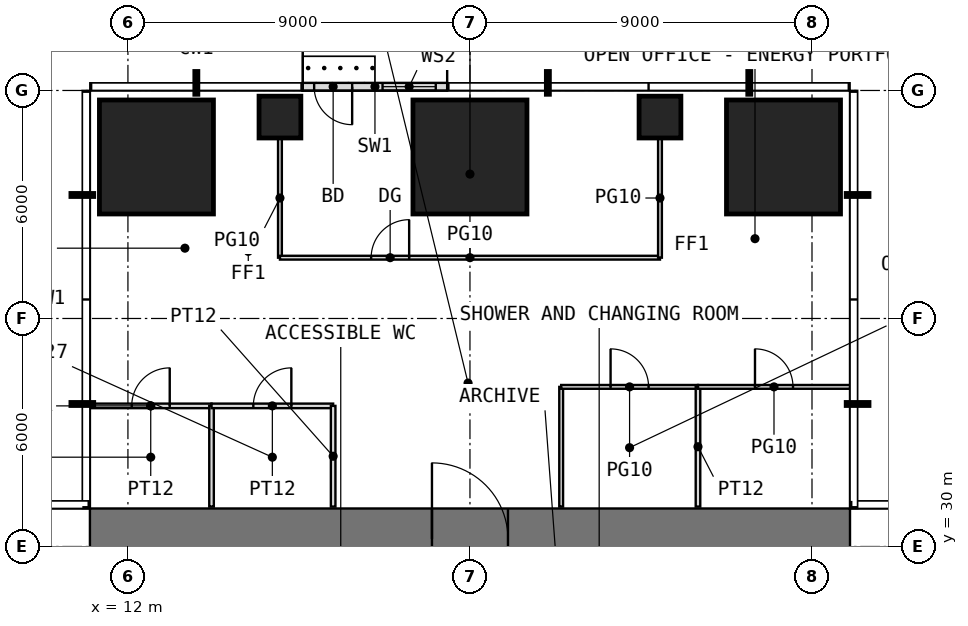
"""IFC4 building model, lengths in metres.
Left out: names, types, materials, properties, quantities, classifications, styles, units other than length and angle.
Written with IfcOpenShell. Run it as: python <this file> out.ifc"""

import sys

from ifc_helpers import new_model, si_unit, direction, frame, frame_2d, origin, origin_2d, place, context, subcontext, project, spatial, rectangle, extrude, element, fill, save


model = new_model("IFC4")
c1 = context("Model", 3, precision=1e-05, world=origin(), true_north=direction((0.0, 1.0)))
c2 = subcontext(c1, "Body", "Model", "MODEL_VIEW")
j1 = project(units=[si_unit("LENGTHUNIT", "METRE"), si_unit("PLANEANGLEUNIT", "RADIAN")], contexts=[c1])
p1 = place(None, origin())
s1 = spatial("IfcSite", under=j1, at=p1, CompositionType="ELEMENT")
p2 = place(p1, origin())
s2 = spatial("IfcBuilding", under=s1, at=p2, CompositionType="ELEMENT")
p3 = place(p2, frame((0.0, 0.0, 132.5)))
s3 = spatial("IfcBuildingStorey", under=s2, at=p3, CompositionType="ELEMENT", Elevation=132.5)
p4 = place(p3, frame((12.75, 40.25, 0.0), z_axis=(0.0, 0.0, 1.0), x_axis=(1.0, 0.0, 0.0)))
e1 = element("IfcColumn", 1, at=p4, inside=s3, PredefinedType="COLUMN", context=c2, shape_type="SweptSolid", body=[
    extrude(rectangle(XDim=3.0, YDim=3.0, at=origin_2d()), origin(), (0.0, 0.0, 1.0), 4.0),
])
p5 = place(p3, frame((16.0, 41.3, 0.0), z_axis=(0.0, 0.0, 1.0), x_axis=(1.0, 0.0, 0.0)))
e2 = element("IfcColumn", 2, at=p5, inside=s3, PredefinedType="COLUMN", context=c2, shape_type="SweptSolid", body=[
    extrude(rectangle(XDim=1.1, YDim=1.1, at=origin_2d()), origin(), (0.0, 0.0, 1.0), 4.0),
])
p6 = place(p3, frame((21.0, 40.25, 0.0), z_axis=(0.0, 0.0, 1.0), x_axis=(1.0, 0.0, 0.0)))
e3 = element("IfcColumn", 3, at=p6, inside=s3, PredefinedType="COLUMN", context=c2, shape_type="SweptSolid", body=[
    extrude(rectangle(XDim=3.0, YDim=3.0, at=origin_2d()), origin(), (0.0, 0.0, 1.0), 4.0),
])
p7 = place(p3, frame((26.0, 41.3, 0.0), z_axis=(0.0, 0.0, 1.0), x_axis=(1.0, 0.0, 0.0)))
e4 = element("IfcColumn", 4, at=p7, inside=s3, PredefinedType="COLUMN", context=c2, shape_type="SweptSolid", body=[
    extrude(rectangle(XDim=1.1, YDim=1.1, at=origin_2d()), origin(), (0.0, 0.0, 1.0), 4.0),
])
p8 = place(p3, frame((29.25, 40.25, 0.0), z_axis=(0.0, 0.0, 1.0), x_axis=(1.0, 0.0, 0.0)))
e5 = element("IfcColumn", 5, at=p8, inside=s3, PredefinedType="COLUMN", context=c2, shape_type="SweptSolid", body=[
    extrude(rectangle(XDim=3.0, YDim=3.0, at=origin_2d()), origin(), (0.0, 0.0, 1.0), 4.0),
])
p9 = place(p3, frame((20.4, 42.1, 0.0), z_axis=(0.0, 0.0, 1.0), x_axis=(-1.0, 0.0, 0.0)))
e6 = element("IfcWall", 6, at=p9, inside=s3, PredefinedType="USERDEFINED", context=c2, shape_type="SweptSolid", body=[
    extrude(rectangle(XDim=3.8, YDim=0.2, at=frame_2d((1.9, 0.0))), origin(), (0.0, 0.0, 1.0), 3.75),
])
p10 = place(p9, frame((2.5, 0.0, 0.0)))
e7 = element("IfcOpeningElement", 7, at=p10, cuts=e6, PredefinedType="OPENING", context=c2, shape_type="SweptSolid", body=[
    extrude(rectangle(XDim=1.0, YDim=2.4, at=frame_2d((0.5, 1.2))), frame((0.0, 0.11, 0.0), z_axis=(0.0, -1.0, 0.0), x_axis=(1.0, 0.0, 0.0)), (0.0, 0.0, 1.0), 0.22),
])
p11 = place(p9, frame((0.3, 0.0, 0.3)))
e8 = element("IfcOpeningElement", 8, at=p11, cuts=e6, PredefinedType="OPENING", context=c2, shape_type="SweptSolid", body=[
    extrude(rectangle(XDim=1.4, YDim=2.7, at=frame_2d((0.7, 1.35))), frame((0.0, 0.11, 0.0), z_axis=(0.0, -1.0, 0.0), x_axis=(1.0, 0.0, 0.0)), (0.0, 0.0, 1.0), 0.22),
])
p12 = place(p3, frame((11.0, 30.2, -0.05), z_axis=(0.0, 0.0, 1.0), x_axis=(1.0, 0.0, 0.0)))
e9 = element("IfcWall", 9, at=p12, inside=s3, PredefinedType="SHEAR", context=c2, shape_type="SweptSolid", body=[
    extrude(rectangle(XDim=20.0, YDim=1.6, at=frame_2d((10.0, 0.0))), origin(), (0.0, 0.0, 1.0), 4.0),
])
p13 = place(p12, frame((9.0, 0.0, 0.05)))
e10 = element("IfcOpeningElement", 10, at=p13, cuts=e9, PredefinedType="OPENING", context=c2, shape_type="SweptSolid", body=[
    extrude(rectangle(XDim=2.0, YDim=2.2, at=frame_2d((1.0, 1.1))), frame((0.0, 0.81, 0.0), z_axis=(0.0, -1.0, 0.0), x_axis=(1.0, 0.0, 0.0)), (0.0, 0.0, 1.0), 1.62),
])
p14 = place(p3, frame((11.0, 33.7, 0.0), z_axis=(0.0, 0.0, 1.0), x_axis=(1.0, 0.0, 0.0)))
e11 = element("IfcWall", 11, at=p14, inside=s3, PredefinedType="PARTITIONING", context=c2, shape_type="SweptSolid", body=[
    extrude(rectangle(XDim=3.2, YDim=0.12, at=frame_2d((1.6, 0.0))), origin(), (0.0, 0.0, 1.0), 3.75),
])
p15 = place(p14, frame((1.1, 0.0, 0.0)))
e12 = element("IfcOpeningElement", 12, at=p15, cuts=e11, PredefinedType="OPENING", context=c2, shape_type="SweptSolid", body=[
    extrude(rectangle(XDim=1.0, YDim=2.2, at=frame_2d((0.5, 1.1))), frame((0.0, 0.07, 0.0), z_axis=(0.0, -1.0, 0.0), x_axis=(1.0, 0.0, 0.0)), (0.0, 0.0, 1.0), 0.14),
])
p16 = place(p3, frame((14.2, 31.05, 0.0), z_axis=(0.0, 0.0, 1.0), x_axis=(0.0, 1.0, 0.0)))
e13 = element("IfcWall", 13, at=p16, inside=s3, PredefinedType="PARTITIONING", context=c2, shape_type="SweptSolid", body=[
    extrude(rectangle(XDim=2.65, YDim=0.12, at=frame_2d((1.325, 0.0))), origin(), (0.0, 0.0, 1.0), 3.75),
])
p17 = place(p3, frame((14.2, 33.7, 0.0), z_axis=(0.0, 0.0, 1.0), x_axis=(1.0, 0.0, 0.0)))
e14 = element("IfcWall", 14, at=p17, inside=s3, PredefinedType="PARTITIONING", context=c2, shape_type="SweptSolid", body=[
    extrude(rectangle(XDim=3.2, YDim=0.12, at=frame_2d((1.6, 0.0))), origin(), (0.0, 0.0, 1.0), 3.75),
])
p18 = place(p17, frame((1.1, 0.0, 0.0)))
e15 = element("IfcOpeningElement", 15, at=p18, cuts=e14, PredefinedType="OPENING", context=c2, shape_type="SweptSolid", body=[
    extrude(rectangle(XDim=1.0, YDim=2.2, at=frame_2d((0.5, 1.1))), frame((0.0, 0.07, 0.0), z_axis=(0.0, -1.0, 0.0), x_axis=(1.0, 0.0, 0.0)), (0.0, 0.0, 1.0), 0.14),
])
p19 = place(p3, frame((16.0, 37.6, 0.0), z_axis=(0.0, 0.0, 1.0), x_axis=(0.0, 1.0, 0.0)))
e16 = element("IfcWall", 16, at=p19, inside=s3, PredefinedType="PARTITIONING", context=c2, shape_type="SweptSolid", body=[
    extrude(rectangle(XDim=3.14, YDim=0.1, at=frame_2d((1.57, 0.0))), origin(), (0.0, 0.0, 1.0), 3.75),
])
p20 = place(p3, frame((16.0, 37.6, 0.0), z_axis=(0.0, 0.0, 1.0), x_axis=(1.0, 0.0, 0.0)))
e17 = element("IfcWall", 17, at=p20, inside=s3, PredefinedType="PARTITIONING", context=c2, shape_type="SweptSolid", body=[
    extrude(rectangle(XDim=10.0, YDim=0.1, at=frame_2d((5.0, 0.0))), origin(), (0.0, 0.0, 1.0), 3.75),
])
p21 = place(p20, frame((2.4, 0.0, 0.0)))
e18 = element("IfcOpeningElement", 18, at=p21, cuts=e17, PredefinedType="OPENING", context=c2, shape_type="SweptSolid", body=[
    extrude(rectangle(XDim=1.0, YDim=2.4, at=frame_2d((0.5, 1.2))), frame((0.0, 0.06, 0.0), z_axis=(0.0, -1.0, 0.0), x_axis=(1.0, 0.0, 0.0)), (0.0, 0.0, 1.0), 0.12),
])
p22 = place(p3, frame((17.4, 31.05, 0.0), z_axis=(0.0, 0.0, 1.0), x_axis=(0.0, 1.0, 0.0)))
e19 = element("IfcWall", 19, at=p22, inside=s3, PredefinedType="PARTITIONING", context=c2, shape_type="SweptSolid", body=[
    extrude(rectangle(XDim=2.65, YDim=0.12, at=frame_2d((1.325, 0.0))), origin(), (0.0, 0.0, 1.0), 3.75),
])
p23 = place(p3, frame((23.4, 31.05, 0.0), z_axis=(0.0, 0.0, 1.0), x_axis=(0.0, 1.0, 0.0)))
e20 = element("IfcWall", 20, at=p23, inside=s3, PredefinedType="PARTITIONING", context=c2, shape_type="SweptSolid", body=[
    extrude(rectangle(XDim=3.15, YDim=0.1, at=frame_2d((1.575, 0.0))), origin(), (0.0, 0.0, 1.0), 3.75),
])
p24 = place(p3, frame((23.4, 34.2, 0.0), z_axis=(0.0, 0.0, 1.0), x_axis=(1.0, 0.0, 0.0)))
e21 = element("IfcWall", 21, at=p24, inside=s3, PredefinedType="PARTITIONING", context=c2, shape_type="SweptSolid", body=[
    extrude(rectangle(XDim=3.6, YDim=0.1, at=frame_2d((1.8, 0.0))), origin(), (0.0, 0.0, 1.0), 3.75),
])
p25 = place(p24, frame((1.3, 0.0, 0.0)))
e22 = element("IfcOpeningElement", 22, at=p25, cuts=e21, PredefinedType="OPENING", context=c2, shape_type="SweptSolid", body=[
    extrude(rectangle(XDim=1.0, YDim=2.4, at=frame_2d((0.5, 1.2))), frame((0.0, 0.06, 0.0), z_axis=(0.0, -1.0, 0.0), x_axis=(1.0, 0.0, 0.0)), (0.0, 0.0, 1.0), 0.12),
])
p26 = place(p3, frame((26.0, 37.6, 0.0), z_axis=(0.0, 0.0, 1.0), x_axis=(0.0, 1.0, 0.0)))
e23 = element("IfcWall", 23, at=p26, inside=s3, PredefinedType="PARTITIONING", context=c2, shape_type="SweptSolid", body=[
    extrude(rectangle(XDim=3.14, YDim=0.1, at=frame_2d((1.57, 0.0))), origin(), (0.0, 0.0, 1.0), 3.75),
])
p27 = place(p3, frame((27.0, 31.05, 0.0), z_axis=(0.0, 0.0, 1.0), x_axis=(0.0, 1.0, 0.0)))
e24 = element("IfcWall", 24, at=p27, inside=s3, PredefinedType="PARTITIONING", context=c2, shape_type="SweptSolid", body=[
    extrude(rectangle(XDim=3.15, YDim=0.12, at=frame_2d((1.575, 0.0))), origin(), (0.0, 0.0, 1.0), 3.75),
])
p28 = place(p3, frame((27.0, 34.2, 0.0), z_axis=(0.0, 0.0, 1.0), x_axis=(1.0, 0.0, 0.0)))
e25 = element("IfcWall", 25, at=p28, inside=s3, PredefinedType="PARTITIONING", context=c2, shape_type="SweptSolid", body=[
    extrude(rectangle(XDim=4.0, YDim=0.1, at=frame_2d((2.0, 0.0))), origin(), (0.0, 0.0, 1.0), 3.75),
])
p29 = place(p28, frame((1.5, 0.0, 0.0)))
e26 = element("IfcOpeningElement", 26, at=p29, cuts=e25, PredefinedType="OPENING", context=c2, shape_type="SweptSolid", body=[
    extrude(rectangle(XDim=1.0, YDim=2.4, at=frame_2d((0.5, 1.2))), frame((0.0, 0.06, 0.0), z_axis=(0.0, -1.0, 0.0), x_axis=(1.0, 0.0, 0.0)), (0.0, 0.0, 1.0), 0.12),
])
p30 = place(p10, origin())
e27 = element("IfcDoor", 27, at=p30, inside=s3, OperationType="SINGLE_SWING_LEFT", PredefinedType="DOOR", context=c2, shape_type="SweptSolid", body=[
    extrude(rectangle(XDim=1.0, YDim=2.4, at=frame_2d((0.5, 1.2))), frame((0.0, 0.025, 0.0), z_axis=(0.0, -1.0, 0.0), x_axis=(1.0, 0.0, 0.0)), (0.0, 0.0, 1.0), 0.05),
])
fill(e7, e27)
p31 = place(p11, origin())
e28 = element("IfcWindow", 28, at=p31, inside=s3, PartitioningType="SINGLE_PANEL", PredefinedType="WINDOW", context=c2, shape_type="SweptSolid", body=[
    extrude(rectangle(XDim=1.4, YDim=2.7, at=frame_2d((0.7, 1.35))), frame((0.0, 0.03, 0.0), z_axis=(0.0, -1.0, 0.0), x_axis=(1.0, 0.0, 0.0)), (0.0, 0.0, 1.0), 0.06),
])
fill(e8, e28)
p32 = place(p13, origin())
e29 = element("IfcDoor", 29, at=p32, inside=s3, OperationType="DOUBLE_DOOR_SINGLE_SWING", PredefinedType="DOOR", context=c2, shape_type="SweptSolid", body=[
    extrude(rectangle(XDim=2.0, YDim=2.2, at=frame_2d((1.0, 1.1))), frame((0.0, 0.025, 0.0), z_axis=(0.0, -1.0, 0.0), x_axis=(1.0, 0.0, 0.0)), (0.0, 0.0, 1.0), 0.05),
])
fill(e10, e29)
p33 = place(p15, origin())
e30 = element("IfcDoor", 30, at=p33, inside=s3, OperationType="SINGLE_SWING_RIGHT", PredefinedType="DOOR", context=c2, shape_type="SweptSolid", body=[
    extrude(rectangle(XDim=1.0, YDim=2.2, at=frame_2d((0.5, 1.1))), frame((0.0, 0.025, 0.0), z_axis=(0.0, -1.0, 0.0), x_axis=(1.0, 0.0, 0.0)), (0.0, 0.0, 1.0), 0.05),
])
fill(e12, e30)
p34 = place(p18, origin())
e31 = element("IfcDoor", 31, at=p34, inside=s3, OperationType="SINGLE_SWING_RIGHT", PredefinedType="DOOR", context=c2, shape_type="SweptSolid", body=[
    extrude(rectangle(XDim=1.0, YDim=2.2, at=frame_2d((0.5, 1.1))), frame((0.0, 0.025, 0.0), z_axis=(0.0, -1.0, 0.0), x_axis=(1.0, 0.0, 0.0)), (0.0, 0.0, 1.0), 0.05),
])
fill(e15, e31)
p35 = place(p25, origin())
e32 = element("IfcDoor", 32, at=p35, inside=s3, OperationType="SINGLE_SWING_LEFT", PredefinedType="DOOR", context=c2, shape_type="SweptSolid", body=[
    extrude(rectangle(XDim=1.0, YDim=2.4, at=frame_2d((0.5, 1.2))), frame((0.0, 0.025, 0.0), z_axis=(0.0, -1.0, 0.0), x_axis=(1.0, 0.0, 0.0)), (0.0, 0.0, 1.0), 0.05),
])
fill(e22, e32)
p36 = place(p29, origin())
e33 = element("IfcDoor", 33, at=p36, inside=s3, OperationType="SINGLE_SWING_LEFT", PredefinedType="DOOR", context=c2, shape_type="SweptSolid", body=[
    extrude(rectangle(XDim=1.0, YDim=2.4, at=frame_2d((0.5, 1.2))), frame((0.0, 0.025, 0.0), z_axis=(0.0, -1.0, 0.0), x_axis=(1.0, 0.0, 0.0)), (0.0, 0.0, 1.0), 0.05),
])
fill(e26, e33)
p37 = place(p21, origin())
e34 = element("IfcDoor", 34, at=p37, inside=s3, OperationType="SINGLE_SWING_RIGHT", PredefinedType="DOOR", context=c2, shape_type="SweptSolid", body=[
    extrude(rectangle(XDim=1.0, YDim=2.4, at=frame_2d((0.5, 1.2))), frame((0.0, 0.025, 0.0), z_axis=(0.0, -1.0, 0.0), x_axis=(1.0, 0.0, 0.0)), (0.0, 0.0, 1.0), 0.05),
])
fill(e18, e34)
save(model, sys.argv[1])
